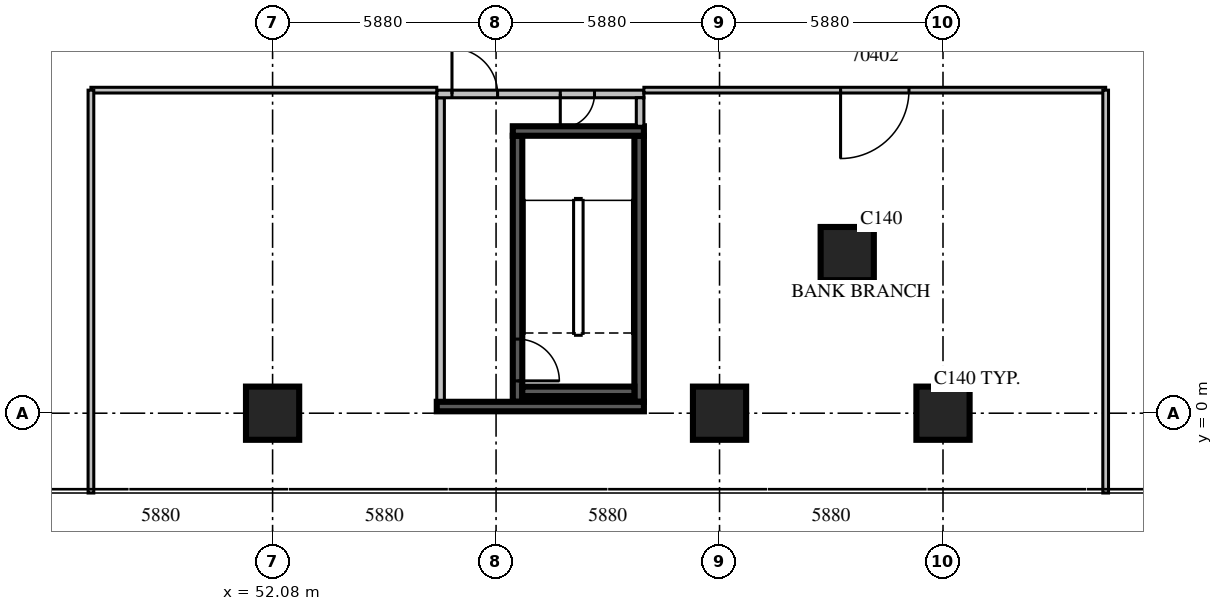
"""IFC4 building model, lengths in metres.
Left out: names, types, materials, properties, quantities, classifications, styles, units other than length and angle.
Written with IfcOpenShell. Run it as: python <this file> out.ifc"""

import sys

from ifc_helpers import new_model, si_unit, direction, frame, frame_2d, origin, origin_2d, place, context, subcontext, project, spatial, rectangle, extrude, source, transform, mapped, element, fill, save


model = new_model("IFC4")
c1 = context("Model", 3, precision=1e-05, world=origin(), true_north=direction((0.0, 1.0)))
c2 = subcontext(c1, "Body", "Model", "MODEL_VIEW")
j1 = project(units=[si_unit("LENGTHUNIT", "METRE"), si_unit("PLANEANGLEUNIT", "RADIAN")], contexts=[c1])
p1 = place(None, origin())
s1 = spatial("IfcSite", under=j1, at=p1, CompositionType="ELEMENT")
p2 = place(p1, origin())
s2 = spatial("IfcBuilding", under=s1, at=p2, CompositionType="ELEMENT")
p3 = place(p2, frame((0.0, 0.0, 7.5)))
s3 = spatial("IfcBuildingStorey", under=s2, at=p3, CompositionType="ELEMENT", Elevation=7.5)
m1 = source(origin(), c2, "Body", "SweptSolid", [
    extrude(rectangle(XDim=1.4, YDim=1.4, at=origin_2d()), origin(), (0.0, 0.0, 1.0), 5.4),
])
for number, where, z_axis, x_axis in (
    (1, (52.08, 0.0, 0.0), (0.0, 0.0, 1.0), (1.0, 0.0, 0.0)),
    (2, (63.84, 0.0, 0.0), (0.0, 0.0, 1.0), (1.0, 0.0, 0.0)),
    (3, (67.2, 4.2, 0.0), (0.0, 0.0, 1.0), (1.0, 0.0, 0.0)),
    (4, (69.72, 0.0, 0.0), (0.0, 0.0, 1.0), (1.0, 0.0, 0.0)),
):
    element("IfcColumn", number, at=place(p3, frame(where, z_axis=z_axis, x_axis=x_axis)), inside=s3, PredefinedType="COLUMN", context=c2, shape_type="MappedRepresentation", body=[
        mapped(m1, transform((0.0, 0.0, 0.0), scale=1.0)),
    ])
m2 = source(origin(), c2, "Body", "SweptSolid", [
    extrude(rectangle(XDim=7.0, YDim=0.25, at=frame_2d((3.5, 0.0))), origin(), (0.0, 0.0, 1.0), 4.8),
])
p4 = place(p3, frame((58.525, 0.3, 0.0), z_axis=(0.0, 0.0, 1.0), x_axis=(0.0, 1.0, 0.0)))
e5 = element("IfcWall", 5, at=p4, inside=s3, PredefinedType="SOLIDWALL", context=c2, shape_type="MappedRepresentation", body=[
    mapped(m2, transform((0.0, 0.0, 0.0), scale=1.0)),
])
m3 = source(origin(), c2, "Body", "SweptSolid", [
    extrude(rectangle(XDim=1.1, YDim=2.1, at=frame_2d((0.55, 1.05))), frame((0.0, 0.135, 0.0), z_axis=(0.0, -1.0, 0.0), x_axis=(1.0, 0.0, 0.0)), (0.0, 0.0, 1.0), 0.27),
])
p5 = place(p4, frame((0.55, 0.0, 0.0)))
e6 = element("IfcOpeningElement", 6, at=p5, cuts=e5, PredefinedType="OPENING", context=c2, shape_type="MappedRepresentation", body=[
    mapped(m3, transform((0.0, 0.0, 0.0), scale=1.0)),
])
p6 = place(p3, frame((61.725, 0.3, 0.0), z_axis=(0.0, 0.0, 1.0), x_axis=(0.0, 1.0, 0.0)))
e7 = element("IfcWall", 7, at=p6, inside=s3, PredefinedType="SOLIDWALL", context=c2, shape_type="MappedRepresentation", body=[
    mapped(m2, transform((0.0, 0.0, 0.0), scale=1.0)),
])
m4 = source(origin(), c2, "Body", "SweptSolid", [
    extrude(rectangle(XDim=3.45, YDim=0.25, at=frame_2d((1.725, 0.0))), origin(), (0.0, 0.0, 1.0), 4.8),
])
p7 = place(p3, frame((58.4, 7.425, 0.0), z_axis=(0.0, 0.0, 1.0), x_axis=(1.0, 0.0, 0.0)))
e8 = element("IfcWall", 8, at=p7, inside=s3, PredefinedType="SOLIDWALL", context=c2, shape_type="MappedRepresentation", body=[
    mapped(m4, transform((0.0, 0.0, 0.0), scale=1.0)),
])
m5 = source(origin(), c2, "Body", "SweptSolid", [
    extrude(rectangle(XDim=2.95, YDim=0.25, at=frame_2d((1.475, 0.0))), origin(), (0.0, 0.0, 1.0), 4.8),
])
p8 = place(p3, frame((58.65, 0.575, 0.0), z_axis=(0.0, 0.0, 1.0), x_axis=(1.0, 0.0, 0.0)))
e9 = element("IfcWall", 9, at=p8, inside=s3, PredefinedType="SOLIDWALL", context=c2, shape_type="MappedRepresentation", body=[
    mapped(m5, transform((0.0, 0.0, 0.0), scale=1.0)),
])
m6 = source(origin(), c2, "Body", "SweptSolid", [
    extrude(rectangle(XDim=8.0, YDim=0.2, at=frame_2d((4.0, 0.0))), origin(), (0.0, 0.0, 1.0), 4.8),
])
p9 = place(p3, frame((56.5, 0.3, 0.0), z_axis=(0.0, 0.0, 1.0), x_axis=(0.0, 1.0, 0.0)))
e10 = element("IfcWall", 10, at=p9, inside=s3, PredefinedType="PARTITIONING", context=c2, shape_type="MappedRepresentation", body=[
    mapped(m6, transform((0.0, 0.0, 0.0), scale=1.0)),
])
m7 = source(origin(), c2, "Body", "SweptSolid", [
    extrude(rectangle(XDim=5.45, YDim=0.2, at=frame_2d((2.725, 0.0))), origin(), (0.0, 0.0, 1.0), 4.8),
])
p10 = place(p3, frame((56.4, 8.4, 0.0), z_axis=(0.0, 0.0, 1.0), x_axis=(1.0, 0.0, 0.0)))
e11 = element("IfcWall", 11, at=p10, inside=s3, PredefinedType="PARTITIONING", context=c2, shape_type="MappedRepresentation", body=[
    mapped(m7, transform((0.0, 0.0, 0.0), scale=1.0)),
])
m8 = source(origin(), c2, "Body", "SweptSolid", [
    extrude(rectangle(XDim=1.2, YDim=2.1, at=frame_2d((0.6, 1.05))), frame((0.0, 0.11, 0.0), z_axis=(0.0, -1.0, 0.0), x_axis=(1.0, 0.0, 0.0)), (0.0, 0.0, 1.0), 0.22),
])
p11 = place(p10, frame((0.4, 0.0, 0.0)))
e12 = element("IfcOpeningElement", 12, at=p11, cuts=e11, PredefinedType="OPENING", context=c2, shape_type="MappedRepresentation", body=[
    mapped(m8, transform((0.0, 0.0, 0.0), scale=1.0)),
])
m9 = source(origin(), c2, "Body", "SweptSolid", [
    extrude(rectangle(XDim=0.9, YDim=2.1, at=frame_2d((0.45, 1.05))), frame((0.0, 0.11, 0.0), z_axis=(0.0, -1.0, 0.0), x_axis=(1.0, 0.0, 0.0)), (0.0, 0.0, 1.0), 0.22),
])
p12 = place(p10, frame((3.25, 0.0, 0.0)))
e13 = element("IfcOpeningElement", 13, at=p12, cuts=e11, PredefinedType="OPENING", context=c2, shape_type="MappedRepresentation", body=[
    mapped(m9, transform((0.0, 0.0, 0.0), scale=1.0)),
])
m10 = source(origin(), c2, "Body", "SweptSolid", [
    extrude(rectangle(XDim=0.75, YDim=0.2, at=frame_2d((0.375, 0.0))), origin(), (0.0, 0.0, 1.0), 4.8),
])
p13 = place(p3, frame((61.75, 7.55, 0.0), z_axis=(0.0, 0.0, 1.0), x_axis=(0.0, 1.0, 0.0)))
e14 = element("IfcWall", 14, at=p13, inside=s3, PredefinedType="PARTITIONING", context=c2, shape_type="MappedRepresentation", body=[
    mapped(m10, transform((0.0, 0.0, 0.0), scale=1.0)),
])
m11 = source(origin(), c2, "Body", "SweptSolid", [
    extrude(rectangle(XDim=5.45, YDim=0.25, at=frame_2d((2.725, 0.0))), origin(), (0.0, 0.0, 1.0), 4.8),
])
p14 = place(p3, frame((56.4, 0.175, 0.0), z_axis=(0.0, 0.0, 1.0), x_axis=(1.0, 0.0, 0.0)))
e15 = element("IfcWall", 15, at=p14, inside=s3, PredefinedType="SOLIDWALL", context=c2, shape_type="MappedRepresentation", body=[
    mapped(m11, transform((0.0, 0.0, 0.0), scale=1.0)),
])
p15 = place(p3, frame((47.3, 8.5, 0.0), z_axis=(0.0, 0.0, 1.0), x_axis=(1.0, 0.0, 0.0)))
e16 = element("IfcWall", 16, at=p15, inside=s3, PredefinedType="PARTITIONING", context=c2, shape_type="SweptSolid", body=[
    extrude(rectangle(XDim=9.1, YDim=0.15, at=frame_2d((4.55, 0.0))), origin(), (0.0, 0.0, 1.0), 4.8),
])
p16 = place(p3, frame((61.85, 8.5, 0.0), z_axis=(0.0, 0.0, 1.0), x_axis=(1.0, 0.0, 0.0)))
e17 = element("IfcWall", 17, at=p16, inside=s3, PredefinedType="PARTITIONING", context=c2, shape_type="SweptSolid", body=[
    extrude(rectangle(XDim=12.15, YDim=0.15, at=frame_2d((6.075, 0.0))), origin(), (0.0, 0.0, 1.0), 4.8),
])
m12 = source(origin(), c2, "Body", "SweptSolid", [
    extrude(rectangle(XDim=1.8, YDim=2.1, at=frame_2d((0.9, 1.05))), frame((0.0, 0.085, 0.0), z_axis=(0.0, -1.0, 0.0), x_axis=(1.0, 0.0, 0.0)), (0.0, 0.0, 1.0), 0.17),
])
p17 = place(p16, frame((5.175, 0.0, 0.0)))
e18 = element("IfcOpeningElement", 18, at=p17, cuts=e17, PredefinedType="OPENING", context=c2, shape_type="MappedRepresentation", body=[
    mapped(m12, transform((0.0, 0.0, 0.0), scale=1.0)),
])
m13 = source(origin(), c2, "Body", "SweptSolid", [
    extrude(rectangle(XDim=10.6, YDim=0.15, at=frame_2d((5.3, 0.0))), origin(), (0.0, 0.0, 1.0), 4.8),
])
for number, where, z_axis, x_axis in (
    (19, (47.3, -2.1, 0.0), (0.0, 0.0, 1.0), (0.0, 1.0, 0.0)),
    (20, (74.0, -2.1, 0.0), (0.0, 0.0, 1.0), (0.0, 1.0, 0.0)),
):
    element("IfcWall", number, at=place(p3, frame(where, z_axis=z_axis, x_axis=x_axis)), inside=s3, PredefinedType="PARTITIONING", context=c2, shape_type="MappedRepresentation", body=[
        mapped(m13, transform((0.0, 0.0, 0.0), scale=1.0)),
    ])
m14 = source(origin(), c2, "Body", "SweptSolid", [
    extrude(rectangle(XDim=1.1, YDim=2.1, at=frame_2d((0.55, 1.05))), frame((0.0, 0.025, 0.0), z_axis=(0.0, -1.0, 0.0), x_axis=(1.0, 0.0, 0.0)), (0.0, 0.0, 1.0), 0.05),
])
p18 = place(p5, origin())
e21 = element("IfcDoor", 21, at=p18, inside=s3, OperationType="SINGLE_SWING_RIGHT", PredefinedType="DOOR", context=c2, shape_type="MappedRepresentation", body=[
    mapped(m14, transform((0.0, 0.0, 0.0), scale=1.0)),
])
fill(e6, e21)
m15 = source(origin(), c2, "Body", "SweptSolid", [
    extrude(rectangle(XDim=1.2, YDim=2.1, at=frame_2d((0.6, 1.05))), frame((0.0, 0.025, 0.0), z_axis=(0.0, -1.0, 0.0), x_axis=(1.0, 0.0, 0.0)), (0.0, 0.0, 1.0), 0.05),
])
p19 = place(p11, origin())
e22 = element("IfcDoor", 22, at=p19, inside=s3, OperationType="SINGLE_SWING_LEFT", PredefinedType="DOOR", context=c2, shape_type="MappedRepresentation", body=[
    mapped(m15, transform((0.0, 0.0, 0.0), scale=1.0)),
])
fill(e12, e22)
m16 = source(origin(), c2, "Body", "SweptSolid", [
    extrude(rectangle(XDim=0.9, YDim=2.1, at=frame_2d((0.45, 1.05))), frame((0.0, 0.025, 0.0), z_axis=(0.0, -1.0, 0.0), x_axis=(1.0, 0.0, 0.0)), (0.0, 0.0, 1.0), 0.05),
])
p20 = place(p12, origin())
e23 = element("IfcDoor", 23, at=p20, inside=s3, OperationType="SINGLE_SWING_RIGHT", PredefinedType="DOOR", context=c2, shape_type="MappedRepresentation", body=[
    mapped(m16, transform((0.0, 0.0, 0.0), scale=1.0)),
])
fill(e13, e23)
m17 = source(origin(), c2, "Body", "SweptSolid", [
    extrude(rectangle(XDim=1.8, YDim=2.1, at=frame_2d((0.9, 1.05))), frame((0.0, 0.025, 0.0), z_axis=(0.0, -1.0, 0.0), x_axis=(1.0, 0.0, 0.0)), (0.0, 0.0, 1.0), 0.05),
])
p21 = place(p17, origin())
e24 = element("IfcDoor", 24, at=p21, inside=s3, OperationType="DOUBLE_DOOR_SINGLE_SWING", PredefinedType="DOOR", context=c2, shape_type="MappedRepresentation", body=[
    mapped(m17, transform((0.0, 0.0, 0.0), scale=1.0)),
])
fill(e18, e24)
save(model, sys.argv[1])
